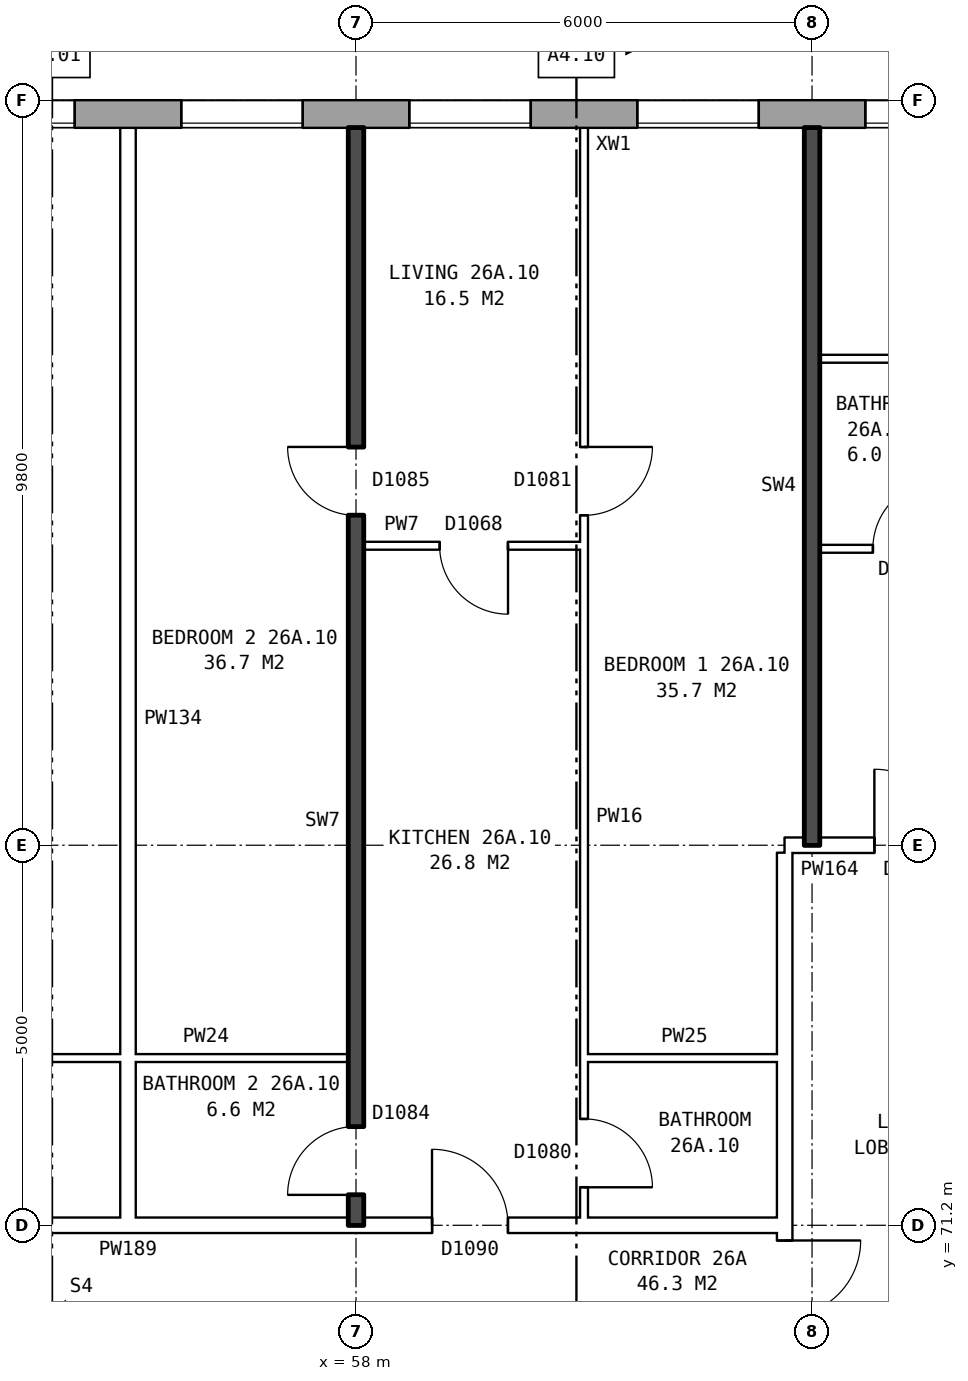
"""IFC4 building model, lengths in metres.
Left out: names, types, materials, properties, quantities, classifications, styles, units other than length and angle.
Written with IfcOpenShell. Run it as: python <this file> out.ifc"""

import sys

from ifc_helpers import new_model, si_unit, direction, frame, frame_2d, origin, place, context, subcontext, project, spatial, rectangle, extrude, element, fill, save


model = new_model("IFC4")
c1 = context("Model", 3, precision=1e-05, world=origin(), true_north=direction((0.0, 1.0)))
c2 = subcontext(c1, "Body", "Model", "MODEL_VIEW")
j1 = project(units=[si_unit("LENGTHUNIT", "METRE"), si_unit("PLANEANGLEUNIT", "RADIAN")], contexts=[c1])
p1 = place(None, origin())
s1 = spatial("IfcSite", under=j1, at=p1, CompositionType="ELEMENT")
p2 = place(p1, origin())
s2 = spatial("IfcBuilding", under=s1, at=p2, CompositionType="ELEMENT")
p3 = place(p2, frame((0.0, 0.0, 96.4)))
s3 = spatial("IfcBuildingStorey", under=s2, at=p3, CompositionType="ELEMENT", Elevation=96.4)
p4 = place(p3, frame((72.925, 85.82, 0.0), z_axis=(0.0, 0.0, 1.0), x_axis=(-1.0, 0.0, 0.0)))
e1 = element("IfcWall", 1, at=p4, inside=s3, PredefinedType="STANDARD", context=c2, shape_type="SweptSolid", body=[
    extrude(rectangle(XDim=44.851, YDim=0.36, at=frame_2d((22.425, 0.0))), origin(), (0.0, 0.0, 1.0), 2.85),
])
p5 = place(p4, frame((0.4, 0.0, 0.8)))
e2 = element("IfcOpeningElement", 2, at=p5, cuts=e1, PredefinedType="OPENING", context=c2, shape_type="SweptSolid", body=[
    extrude(rectangle(XDim=1.0, YDim=0.9, at=frame_2d((0.5, 0.45))), frame((0.0, 0.19, 0.0), z_axis=(0.0, -1.0, 0.0), x_axis=(1.0, 0.0, 0.0)), (0.0, 0.0, 1.0), 0.38),
])
p6 = place(p4, frame((3.625, 0.0, 0.8)))
e3 = element("IfcOpeningElement", 3, at=p6, cuts=e1, PredefinedType="OPENING", context=c2, shape_type="SweptSolid", body=[
    extrude(rectangle(XDim=1.6, YDim=1.8, at=frame_2d((0.8, 0.9))), frame((0.0, 0.19, 0.0), z_axis=(0.0, -1.0, 0.0), x_axis=(1.0, 0.0, 0.0)), (0.0, 0.0, 1.0), 0.38),
])
p7 = place(p4, frame((6.625, 0.0, 0.8)))
e4 = element("IfcOpeningElement", 4, at=p7, cuts=e1, PredefinedType="OPENING", context=c2, shape_type="SweptSolid", body=[
    extrude(rectangle(XDim=1.6, YDim=1.8, at=frame_2d((0.8, 0.9))), frame((0.0, 0.19, 0.0), z_axis=(0.0, -1.0, 0.0), x_axis=(1.0, 0.0, 0.0)), (0.0, 0.0, 1.0), 0.38),
])
p8 = place(p4, frame((9.625, 0.0, 0.8)))
e5 = element("IfcOpeningElement", 5, at=p8, cuts=e1, PredefinedType="OPENING", context=c2, shape_type="SweptSolid", body=[
    extrude(rectangle(XDim=1.6, YDim=1.8, at=frame_2d((0.8, 0.9))), frame((0.0, 0.19, 0.0), z_axis=(0.0, -1.0, 0.0), x_axis=(1.0, 0.0, 0.0)), (0.0, 0.0, 1.0), 0.38),
])
p9 = place(p4, frame((12.625, 0.0, 0.8)))
e6 = element("IfcOpeningElement", 6, at=p9, cuts=e1, PredefinedType="OPENING", context=c2, shape_type="SweptSolid", body=[
    extrude(rectangle(XDim=1.6, YDim=1.8, at=frame_2d((0.8, 0.9))), frame((0.0, 0.19, 0.0), z_axis=(0.0, -1.0, 0.0), x_axis=(1.0, 0.0, 0.0)), (0.0, 0.0, 1.0), 0.38),
])
p10 = place(p4, frame((15.625, 0.0, 0.8)))
e7 = element("IfcOpeningElement", 7, at=p10, cuts=e1, PredefinedType="OPENING", context=c2, shape_type="SweptSolid", body=[
    extrude(rectangle(XDim=1.6, YDim=1.8, at=frame_2d((0.8, 0.9))), frame((0.0, 0.19, 0.0), z_axis=(0.0, -1.0, 0.0), x_axis=(1.0, 0.0, 0.0)), (0.0, 0.0, 1.0), 0.38),
])
p11 = place(p4, frame((18.625, 0.0, 0.8)))
e8 = element("IfcOpeningElement", 8, at=p11, cuts=e1, PredefinedType="OPENING", context=c2, shape_type="SweptSolid", body=[
    extrude(rectangle(XDim=1.6, YDim=1.8, at=frame_2d((0.8, 0.9))), frame((0.0, 0.19, 0.0), z_axis=(0.0, -1.0, 0.0), x_axis=(1.0, 0.0, 0.0)), (0.0, 0.0, 1.0), 0.38),
])
p12 = place(p4, frame((21.625, 0.0, 0.8)))
e9 = element("IfcOpeningElement", 9, at=p12, cuts=e1, PredefinedType="OPENING", context=c2, shape_type="SweptSolid", body=[
    extrude(rectangle(XDim=1.6, YDim=1.8, at=frame_2d((0.8, 0.9))), frame((0.0, 0.19, 0.0), z_axis=(0.0, -1.0, 0.0), x_axis=(1.0, 0.0, 0.0)), (0.0, 0.0, 1.0), 0.38),
])
p13 = place(p4, frame((24.625, 0.0, 0.8)))
e10 = element("IfcOpeningElement", 10, at=p13, cuts=e1, PredefinedType="OPENING", context=c2, shape_type="SweptSolid", body=[
    extrude(rectangle(XDim=1.6, YDim=1.8, at=frame_2d((0.8, 0.9))), frame((0.0, 0.19, 0.0), z_axis=(0.0, -1.0, 0.0), x_axis=(1.0, 0.0, 0.0)), (0.0, 0.0, 1.0), 0.38),
])
p14 = place(p4, frame((27.625, 0.0, 0.8)))
e11 = element("IfcOpeningElement", 11, at=p14, cuts=e1, PredefinedType="OPENING", context=c2, shape_type="SweptSolid", body=[
    extrude(rectangle(XDim=1.6, YDim=1.8, at=frame_2d((0.8, 0.9))), frame((0.0, 0.19, 0.0), z_axis=(0.0, -1.0, 0.0), x_axis=(1.0, 0.0, 0.0)), (0.0, 0.0, 1.0), 0.38),
])
p15 = place(p4, frame((30.625, 0.0, 0.8)))
e12 = element("IfcOpeningElement", 12, at=p15, cuts=e1, PredefinedType="OPENING", context=c2, shape_type="SweptSolid", body=[
    extrude(rectangle(XDim=1.6, YDim=1.8, at=frame_2d((0.8, 0.9))), frame((0.0, 0.19, 0.0), z_axis=(0.0, -1.0, 0.0), x_axis=(1.0, 0.0, 0.0)), (0.0, 0.0, 1.0), 0.38),
])
p16 = place(p4, frame((33.625, 0.0, 0.8)))
e13 = element("IfcOpeningElement", 13, at=p16, cuts=e1, PredefinedType="OPENING", context=c2, shape_type="SweptSolid", body=[
    extrude(rectangle(XDim=1.6, YDim=1.8, at=frame_2d((0.8, 0.9))), frame((0.0, 0.19, 0.0), z_axis=(0.0, -1.0, 0.0), x_axis=(1.0, 0.0, 0.0)), (0.0, 0.0, 1.0), 0.38),
])
p17 = place(p4, frame((36.625, 0.0, 0.8)))
e14 = element("IfcOpeningElement", 14, at=p17, cuts=e1, PredefinedType="OPENING", context=c2, shape_type="SweptSolid", body=[
    extrude(rectangle(XDim=1.6, YDim=1.8, at=frame_2d((0.8, 0.9))), frame((0.0, 0.19, 0.0), z_axis=(0.0, -1.0, 0.0), x_axis=(1.0, 0.0, 0.0)), (0.0, 0.0, 1.0), 0.38),
])
p18 = place(p4, frame((39.625, 0.0, 0.8)))
e15 = element("IfcOpeningElement", 15, at=p18, cuts=e1, PredefinedType="OPENING", context=c2, shape_type="SweptSolid", body=[
    extrude(rectangle(XDim=1.6, YDim=1.8, at=frame_2d((0.8, 0.9))), frame((0.0, 0.19, 0.0), z_axis=(0.0, -1.0, 0.0), x_axis=(1.0, 0.0, 0.0)), (0.0, 0.0, 1.0), 0.38),
])
p19 = place(p4, frame((41.525, 0.0, 0.8)))
e16 = element("IfcOpeningElement", 16, at=p19, cuts=e1, PredefinedType="OPENING", context=c2, shape_type="SweptSolid", body=[
    extrude(rectangle(XDim=1.6, YDim=1.8, at=frame_2d((0.8, 0.9))), frame((0.0, 0.19, 0.0), z_axis=(0.0, -1.0, 0.0), x_axis=(1.0, 0.0, 0.0)), (0.0, 0.0, 1.0), 0.38),
])
p20 = place(p4, frame((1.7, 0.0, 0.8)))
e17 = element("IfcOpeningElement", 17, at=p20, cuts=e1, PredefinedType="OPENING", context=c2, shape_type="SweptSolid", body=[
    extrude(rectangle(XDim=1.0, YDim=1.8, at=frame_2d((0.5, 0.9))), frame((0.0, 0.19, 0.0), z_axis=(0.0, -1.0, 0.0), x_axis=(1.0, 0.0, 0.0)), (0.0, 0.0, 1.0), 0.38),
])
p21 = place(p4, frame((43.425, 0.0, 0.8)))
e18 = element("IfcOpeningElement", 18, at=p21, cuts=e1, PredefinedType="OPENING", context=c2, shape_type="SweptSolid", body=[
    extrude(rectangle(XDim=0.6, YDim=1.2, at=frame_2d((0.3, 0.6))), frame((0.0, 0.19, 0.0), z_axis=(0.0, -1.0, 0.0), x_axis=(1.0, 0.0, 0.0)), (0.0, 0.0, 1.0), 0.38),
])
p22 = place(p3, frame((63.64, 63.9, 0.0), z_axis=(0.0, 0.0, 1.0), x_axis=(0.0, 1.0, 0.0)))
e19 = element("IfcWall", 19, at=p22, inside=s3, PredefinedType="PARTITIONING", context=c2, shape_type="SweptSolid", body=[
    extrude(rectangle(XDim=12.2, YDim=0.2, at=frame_2d((6.1, 0.0))), origin(), (0.0, 0.0, 1.0), 2.85),
])
p23 = place(p22, frame((5.1, 0.0, 0.0)))
e20 = element("IfcOpeningElement", 20, at=p23, cuts=e19, PredefinedType="OPENING", context=c2, shape_type="SweptSolid", body=[
    extrude(rectangle(XDim=2.0, YDim=2.1, at=frame_2d((1.0, 1.05))), frame((0.0, 0.11, 0.0), z_axis=(0.0, -1.0, 0.0), x_axis=(1.0, 0.0, 0.0)), (0.0, 0.0, 1.0), 0.22),
])
p24 = place(p3, frame((44.36, 71.2, 0.0), z_axis=(0.0, 0.0, 1.0), x_axis=(1.0, 0.0, 0.0)))
e21 = element("IfcWall", 21, at=p24, inside=s3, PredefinedType="PARTITIONING", context=c2, shape_type="SweptSolid", body=[
    extrude(rectangle(XDim=19.28, YDim=0.2, at=frame_2d((9.64, 0.0))), origin(), (0.0, 0.0, 1.0), 2.85),
])
p25 = place(p24, frame((14.64, 0.0, 0.0)))
e22 = element("IfcOpeningElement", 22, at=p25, cuts=e21, PredefinedType="OPENING", context=c2, shape_type="SweptSolid", body=[
    extrude(rectangle(XDim=1.0, YDim=2.1, at=frame_2d((0.5, 1.05))), frame((0.0, 0.11, 0.0), z_axis=(0.0, -1.0, 0.0), x_axis=(1.0, 0.0, 0.0)), (0.0, 0.0, 1.0), 0.22),
])
p26 = place(p24, frame((5.64, 0.0, 0.0)))
e23 = element("IfcOpeningElement", 23, at=p26, cuts=e21, PredefinedType="OPENING", context=c2, shape_type="SweptSolid", body=[
    extrude(rectangle(XDim=1.0, YDim=2.1, at=frame_2d((0.5, 1.05))), frame((0.0, 0.11, 0.0), z_axis=(0.0, -1.0, 0.0), x_axis=(1.0, 0.0, 0.0)), (0.0, 0.0, 1.0), 0.22),
])
p27 = place(p3, frame((52.1, 73.4, 0.0), z_axis=(0.0, 0.0, 1.0), x_axis=(1.0, 0.0, 0.0)))
e24 = element("IfcWall", 24, at=p27, inside=s3, PredefinedType="PARTITIONING", context=c2, shape_type="SweptSolid", body=[
    extrude(rectangle(XDim=5.8, YDim=0.1, at=frame_2d((2.9, 0.0))), origin(), (0.0, 0.0, 1.0), 2.85),
])
p28 = place(p3, frame((61.0, 73.4, 0.0), z_axis=(0.0, 0.0, 1.0), x_axis=(1.0, 0.0, 0.0)))
e25 = element("IfcWall", 25, at=p28, inside=s3, PredefinedType="PARTITIONING", context=c2, shape_type="SweptSolid", body=[
    extrude(rectangle(XDim=2.64, YDim=0.1, at=frame_2d((1.32, 0.0))), origin(), (0.0, 0.0, 1.0), 2.85),
])
p29 = place(p3, frame((63.64, 76.2, 0.0), z_axis=(0.0, 0.0, 1.0), x_axis=(1.0, 0.0, 0.0)))
e26 = element("IfcWall", 26, at=p29, inside=s3, PredefinedType="PARTITIONING", context=c2, shape_type="SweptSolid", body=[
    extrude(rectangle(XDim=3.0, YDim=0.2, at=frame_2d((1.5, 0.0))), origin(), (0.0, 0.0, 1.0), 2.85),
])
p30 = place(p29, frame((1.18, 0.0, 0.0)))
e27 = element("IfcOpeningElement", 27, at=p30, cuts=e26, PredefinedType="OPENING", context=c2, shape_type="SweptSolid", body=[
    extrude(rectangle(XDim=1.0, YDim=2.1, at=frame_2d((0.5, 1.05))), frame((0.0, 0.11, 0.0), z_axis=(0.0, -1.0, 0.0), x_axis=(1.0, 0.0, 0.0)), (0.0, 0.0, 1.0), 0.22),
])
p31 = place(p3, frame((64.1, 80.1, 0.0), z_axis=(0.0, 0.0, 1.0), x_axis=(1.0, 0.0, 0.0)))
e28 = element("IfcWall", 28, at=p31, inside=s3, PredefinedType="PARTITIONING", context=c2, shape_type="SweptSolid", body=[
    extrude(rectangle(XDim=5.8, YDim=0.1, at=frame_2d((2.9, 0.0))), origin(), (0.0, 0.0, 1.0), 2.85),
])
p32 = place(p31, frame((3.6, 0.0, 0.0)))
e29 = element("IfcOpeningElement", 29, at=p32, cuts=e28, PredefinedType="OPENING", context=c2, shape_type="SweptSolid", body=[
    extrude(rectangle(XDim=0.9, YDim=2.1, at=frame_2d((0.45, 1.05))), frame((0.0, 0.06, 0.0), z_axis=(0.0, -1.0, 0.0), x_axis=(1.0, 0.0, 0.0)), (0.0, 0.0, 1.0), 0.12),
])
p33 = place(p31, frame((0.7, 0.0, 0.0)))
e30 = element("IfcOpeningElement", 30, at=p33, cuts=e28, PredefinedType="OPENING", context=c2, shape_type="SweptSolid", body=[
    extrude(rectangle(XDim=0.9, YDim=2.1, at=frame_2d((0.45, 1.05))), frame((0.0, 0.06, 0.0), z_axis=(0.0, -1.0, 0.0), x_axis=(1.0, 0.0, 0.0)), (0.0, 0.0, 1.0), 0.12),
])
p34 = place(p3, frame((58.1, 80.14, 0.0), z_axis=(0.0, 0.0, 1.0), x_axis=(1.0, 0.0, 0.0)))
e31 = element("IfcWall", 31, at=p34, inside=s3, PredefinedType="PARTITIONING", context=c2, shape_type="SweptSolid", body=[
    extrude(rectangle(XDim=2.9, YDim=0.1, at=frame_2d((1.45, 0.0))), origin(), (0.0, 0.0, 1.0), 2.85),
])
p35 = place(p34, frame((1.0, 0.0, 0.0)))
e32 = element("IfcOpeningElement", 32, at=p35, cuts=e31, PredefinedType="OPENING", context=c2, shape_type="SweptSolid", body=[
    extrude(rectangle(XDim=0.9, YDim=2.1, at=frame_2d((0.45, 1.05))), frame((0.0, 0.06, 0.0), z_axis=(0.0, -1.0, 0.0), x_axis=(1.0, 0.0, 0.0)), (0.0, 0.0, 1.0), 0.12),
])
p36 = place(p3, frame((64.1, 82.6, 0.0), z_axis=(0.0, 0.0, 1.0), x_axis=(1.0, 0.0, 0.0)))
e33 = element("IfcWall", 33, at=p36, inside=s3, PredefinedType="PARTITIONING", context=c2, shape_type="SweptSolid", body=[
    extrude(rectangle(XDim=2.3, YDim=0.1, at=frame_2d((1.15, 0.0))), origin(), (0.0, 0.0, 1.0), 2.85),
])
p37 = place(p3, frame((55.0, 71.3, 0.0), z_axis=(0.0, 0.0, 1.0), x_axis=(0.0, 1.0, 0.0)))
e34 = element("IfcWall", 34, at=p37, inside=s3, PredefinedType="PARTITIONING", context=c2, shape_type="SweptSolid", body=[
    extrude(rectangle(XDim=14.34, YDim=0.2, at=frame_2d((7.17, 0.0))), origin(), (0.0, 0.0, 1.0), 2.85),
])
p38 = place(p3, frame((58.0, 71.2, 0.0), z_axis=(0.0, 0.0, 1.0), x_axis=(0.0, 1.0, 0.0)))
e35 = element("IfcWall", 35, at=p38, inside=s3, PredefinedType="SOLIDWALL", context=c2, shape_type="SweptSolid", body=[
    extrude(rectangle(XDim=14.44, YDim=0.2, at=frame_2d((7.22, 0.0))), origin(), (0.0, 0.0, 1.0), 2.85),
])
p39 = place(p38, frame((9.34, 0.0, 0.0)))
e36 = element("IfcOpeningElement", 36, at=p39, cuts=e35, PredefinedType="OPENING", context=c2, shape_type="SweptSolid", body=[
    extrude(rectangle(XDim=0.9, YDim=2.1, at=frame_2d((0.45, 1.05))), frame((0.0, 0.11, 0.0), z_axis=(0.0, -1.0, 0.0), x_axis=(1.0, 0.0, 0.0)), (0.0, 0.0, 1.0), 0.22),
])
p40 = place(p38, frame((0.4, 0.0, 0.0)))
e37 = element("IfcOpeningElement", 37, at=p40, cuts=e35, PredefinedType="OPENING", context=c2, shape_type="SweptSolid", body=[
    extrude(rectangle(XDim=0.9, YDim=2.1, at=frame_2d((0.45, 1.05))), frame((0.0, 0.11, 0.0), z_axis=(0.0, -1.0, 0.0), x_axis=(1.0, 0.0, 0.0)), (0.0, 0.0, 1.0), 0.22),
])
p41 = place(p3, frame((61.0, 71.3, 0.0), z_axis=(0.0, 0.0, 1.0), x_axis=(0.0, 1.0, 0.0)))
e38 = element("IfcWall", 38, at=p41, inside=s3, PredefinedType="PARTITIONING", context=c2, shape_type="SweptSolid", body=[
    extrude(rectangle(XDim=14.34, YDim=0.1, at=frame_2d((7.17, 0.0))), origin(), (0.0, 0.0, 1.0), 2.85),
])
p42 = place(p41, frame((9.24, 0.0, 0.0)))
e39 = element("IfcOpeningElement", 39, at=p42, cuts=e38, PredefinedType="OPENING", context=c2, shape_type="SweptSolid", body=[
    extrude(rectangle(XDim=0.9, YDim=2.1, at=frame_2d((0.45, 1.05))), frame((0.0, 0.06, 0.0), z_axis=(0.0, -1.0, 0.0), x_axis=(1.0, 0.0, 0.0)), (0.0, 0.0, 1.0), 0.12),
])
p43 = place(p41, frame((0.4, 0.0, 0.0)))
e40 = element("IfcOpeningElement", 40, at=p43, cuts=e38, PredefinedType="OPENING", context=c2, shape_type="SweptSolid", body=[
    extrude(rectangle(XDim=0.9, YDim=2.1, at=frame_2d((0.45, 1.05))), frame((0.0, 0.06, 0.0), z_axis=(0.0, -1.0, 0.0), x_axis=(1.0, 0.0, 0.0)), (0.0, 0.0, 1.0), 0.12),
])
p44 = place(p3, frame((64.0, 76.2, 0.0), z_axis=(0.0, 0.0, 1.0), x_axis=(0.0, 1.0, 0.0)))
e41 = element("IfcWall", 41, at=p44, inside=s3, PredefinedType="SOLIDWALL", context=c2, shape_type="SweptSolid", body=[
    extrude(rectangle(XDim=9.44, YDim=0.2, at=frame_2d((4.72, 0.0))), origin(), (0.0, 0.0, 1.0), 2.85),
])
p45 = place(p7, origin())
e42 = element("IfcWindow", 42, at=p45, inside=s3, PartitioningType="SINGLE_PANEL", PredefinedType="WINDOW", context=c2, shape_type="SweptSolid", body=[
    extrude(rectangle(XDim=1.6, YDim=1.8, at=frame_2d((0.8, 0.9))), frame((0.0, 0.15, 0.0), z_axis=(0.0, -1.0, 0.0), x_axis=(1.0, 0.0, 0.0)), (0.0, 0.0, 1.0), 0.06),
])
fill(e4, e42)
p46 = place(p8, origin())
e43 = element("IfcWindow", 43, at=p46, inside=s3, PartitioningType="SINGLE_PANEL", PredefinedType="WINDOW", context=c2, shape_type="SweptSolid", body=[
    extrude(rectangle(XDim=1.6, YDim=1.8, at=frame_2d((0.8, 0.9))), frame((0.0, 0.15, 0.0), z_axis=(0.0, -1.0, 0.0), x_axis=(1.0, 0.0, 0.0)), (0.0, 0.0, 1.0), 0.06),
])
fill(e5, e43)
p47 = place(p9, origin())
e44 = element("IfcWindow", 44, at=p47, inside=s3, PartitioningType="SINGLE_PANEL", PredefinedType="WINDOW", context=c2, shape_type="SweptSolid", body=[
    extrude(rectangle(XDim=1.6, YDim=1.8, at=frame_2d((0.8, 0.9))), frame((0.0, 0.15, 0.0), z_axis=(0.0, -1.0, 0.0), x_axis=(1.0, 0.0, 0.0)), (0.0, 0.0, 1.0), 0.06),
])
fill(e6, e44)
p48 = place(p10, origin())
e45 = element("IfcWindow", 45, at=p48, inside=s3, PartitioningType="SINGLE_PANEL", PredefinedType="WINDOW", context=c2, shape_type="SweptSolid", body=[
    extrude(rectangle(XDim=1.6, YDim=1.8, at=frame_2d((0.8, 0.9))), frame((0.0, 0.15, 0.0), z_axis=(0.0, -1.0, 0.0), x_axis=(1.0, 0.0, 0.0)), (0.0, 0.0, 1.0), 0.06),
])
fill(e7, e45)
p49 = place(p11, origin())
e46 = element("IfcWindow", 46, at=p49, inside=s3, PartitioningType="SINGLE_PANEL", PredefinedType="WINDOW", context=c2, shape_type="SweptSolid", body=[
    extrude(rectangle(XDim=1.6, YDim=1.8, at=frame_2d((0.8, 0.9))), frame((0.0, 0.15, 0.0), z_axis=(0.0, -1.0, 0.0), x_axis=(1.0, 0.0, 0.0)), (0.0, 0.0, 1.0), 0.06),
])
fill(e8, e46)
p50 = place(p23, frame((2.0, 0.0, 0.0), z_axis=(0.0, 0.0, 1.0), x_axis=(-1.0, 0.0, 0.0)))
e47 = element("IfcDoor", 47, at=p50, inside=s3, OperationType="DOUBLE_DOOR_SINGLE_SWING", PredefinedType="DOOR", context=c2, shape_type="SweptSolid", body=[
    extrude(rectangle(XDim=2.0, YDim=2.1, at=frame_2d((1.0, 1.05))), frame((0.0, 0.025, 0.0), z_axis=(0.0, -1.0, 0.0), x_axis=(1.0, 0.0, 0.0)), (0.0, 0.0, 1.0), 0.05),
])
fill(e20, e47)
p51 = place(p30, origin())
e48 = element("IfcDoor", 48, at=p51, inside=s3, OperationType="SINGLE_SWING_LEFT", PredefinedType="DOOR", context=c2, shape_type="SweptSolid", body=[
    extrude(rectangle(XDim=1.0, YDim=2.1, at=frame_2d((0.5, 1.05))), frame((0.0, 0.025, 0.0), z_axis=(0.0, -1.0, 0.0), x_axis=(1.0, 0.0, 0.0)), (0.0, 0.0, 1.0), 0.05),
])
fill(e27, e48)
p52 = place(p33, origin())
e49 = element("IfcDoor", 49, at=p52, inside=s3, OperationType="SINGLE_SWING_RIGHT", PredefinedType="DOOR", context=c2, shape_type="SweptSolid", body=[
    extrude(rectangle(XDim=0.9, YDim=2.1, at=frame_2d((0.45, 1.05))), frame((0.0, 0.025, 0.0), z_axis=(0.0, -1.0, 0.0), x_axis=(1.0, 0.0, 0.0)), (0.0, 0.0, 1.0), 0.05),
])
fill(e30, e49)
p53 = place(p42, frame((0.9, 0.0, 0.0), z_axis=(0.0, 0.0, 1.0), x_axis=(-1.0, 0.0, 0.0)))
e50 = element("IfcDoor", 50, at=p53, inside=s3, OperationType="SINGLE_SWING_LEFT", PredefinedType="DOOR", context=c2, shape_type="SweptSolid", body=[
    extrude(rectangle(XDim=0.9, YDim=2.1, at=frame_2d((0.45, 1.05))), frame((0.0, 0.025, 0.0), z_axis=(0.0, -1.0, 0.0), x_axis=(1.0, 0.0, 0.0)), (0.0, 0.0, 1.0), 0.05),
])
fill(e39, e50)
p54 = place(p39, origin())
e51 = element("IfcDoor", 51, at=p54, inside=s3, OperationType="SINGLE_SWING_RIGHT", PredefinedType="DOOR", context=c2, shape_type="SweptSolid", body=[
    extrude(rectangle(XDim=0.9, YDim=2.1, at=frame_2d((0.45, 1.05))), frame((0.0, 0.025, 0.0), z_axis=(0.0, -1.0, 0.0), x_axis=(1.0, 0.0, 0.0)), (0.0, 0.0, 1.0), 0.05),
])
fill(e36, e51)
p55 = place(p25, origin())
e52 = element("IfcDoor", 52, at=p55, inside=s3, OperationType="SINGLE_SWING_LEFT", PredefinedType="DOOR", context=c2, shape_type="SweptSolid", body=[
    extrude(rectangle(XDim=1.0, YDim=2.1, at=frame_2d((0.5, 1.05))), frame((0.0, 0.025, 0.0), z_axis=(0.0, -1.0, 0.0), x_axis=(1.0, 0.0, 0.0)), (0.0, 0.0, 1.0), 0.05),
])
fill(e22, e52)
p56 = place(p35, frame((0.9, 0.0, 0.0), z_axis=(0.0, 0.0, 1.0), x_axis=(-1.0, 0.0, 0.0)))
e53 = element("IfcDoor", 53, at=p56, inside=s3, OperationType="SINGLE_SWING_LEFT", PredefinedType="DOOR", context=c2, shape_type="SweptSolid", body=[
    extrude(rectangle(XDim=0.9, YDim=2.1, at=frame_2d((0.45, 1.05))), frame((0.0, 0.025, 0.0), z_axis=(0.0, -1.0, 0.0), x_axis=(1.0, 0.0, 0.0)), (0.0, 0.0, 1.0), 0.05),
])
fill(e32, e53)
p57 = place(p43, frame((0.9, 0.0, 0.0), z_axis=(0.0, 0.0, 1.0), x_axis=(-1.0, 0.0, 0.0)))
e54 = element("IfcDoor", 54, at=p57, inside=s3, OperationType="SINGLE_SWING_RIGHT", PredefinedType="DOOR", context=c2, shape_type="SweptSolid", body=[
    extrude(rectangle(XDim=0.9, YDim=2.1, at=frame_2d((0.45, 1.05))), frame((0.0, 0.025, 0.0), z_axis=(0.0, -1.0, 0.0), x_axis=(1.0, 0.0, 0.0)), (0.0, 0.0, 1.0), 0.05),
])
fill(e40, e54)
p58 = place(p40, origin())
e55 = element("IfcDoor", 55, at=p58, inside=s3, OperationType="SINGLE_SWING_LEFT", PredefinedType="DOOR", context=c2, shape_type="SweptSolid", body=[
    extrude(rectangle(XDim=0.9, YDim=2.1, at=frame_2d((0.45, 1.05))), frame((0.0, 0.025, 0.0), z_axis=(0.0, -1.0, 0.0), x_axis=(1.0, 0.0, 0.0)), (0.0, 0.0, 1.0), 0.05),
])
fill(e37, e55)
save(model, sys.argv[1])
